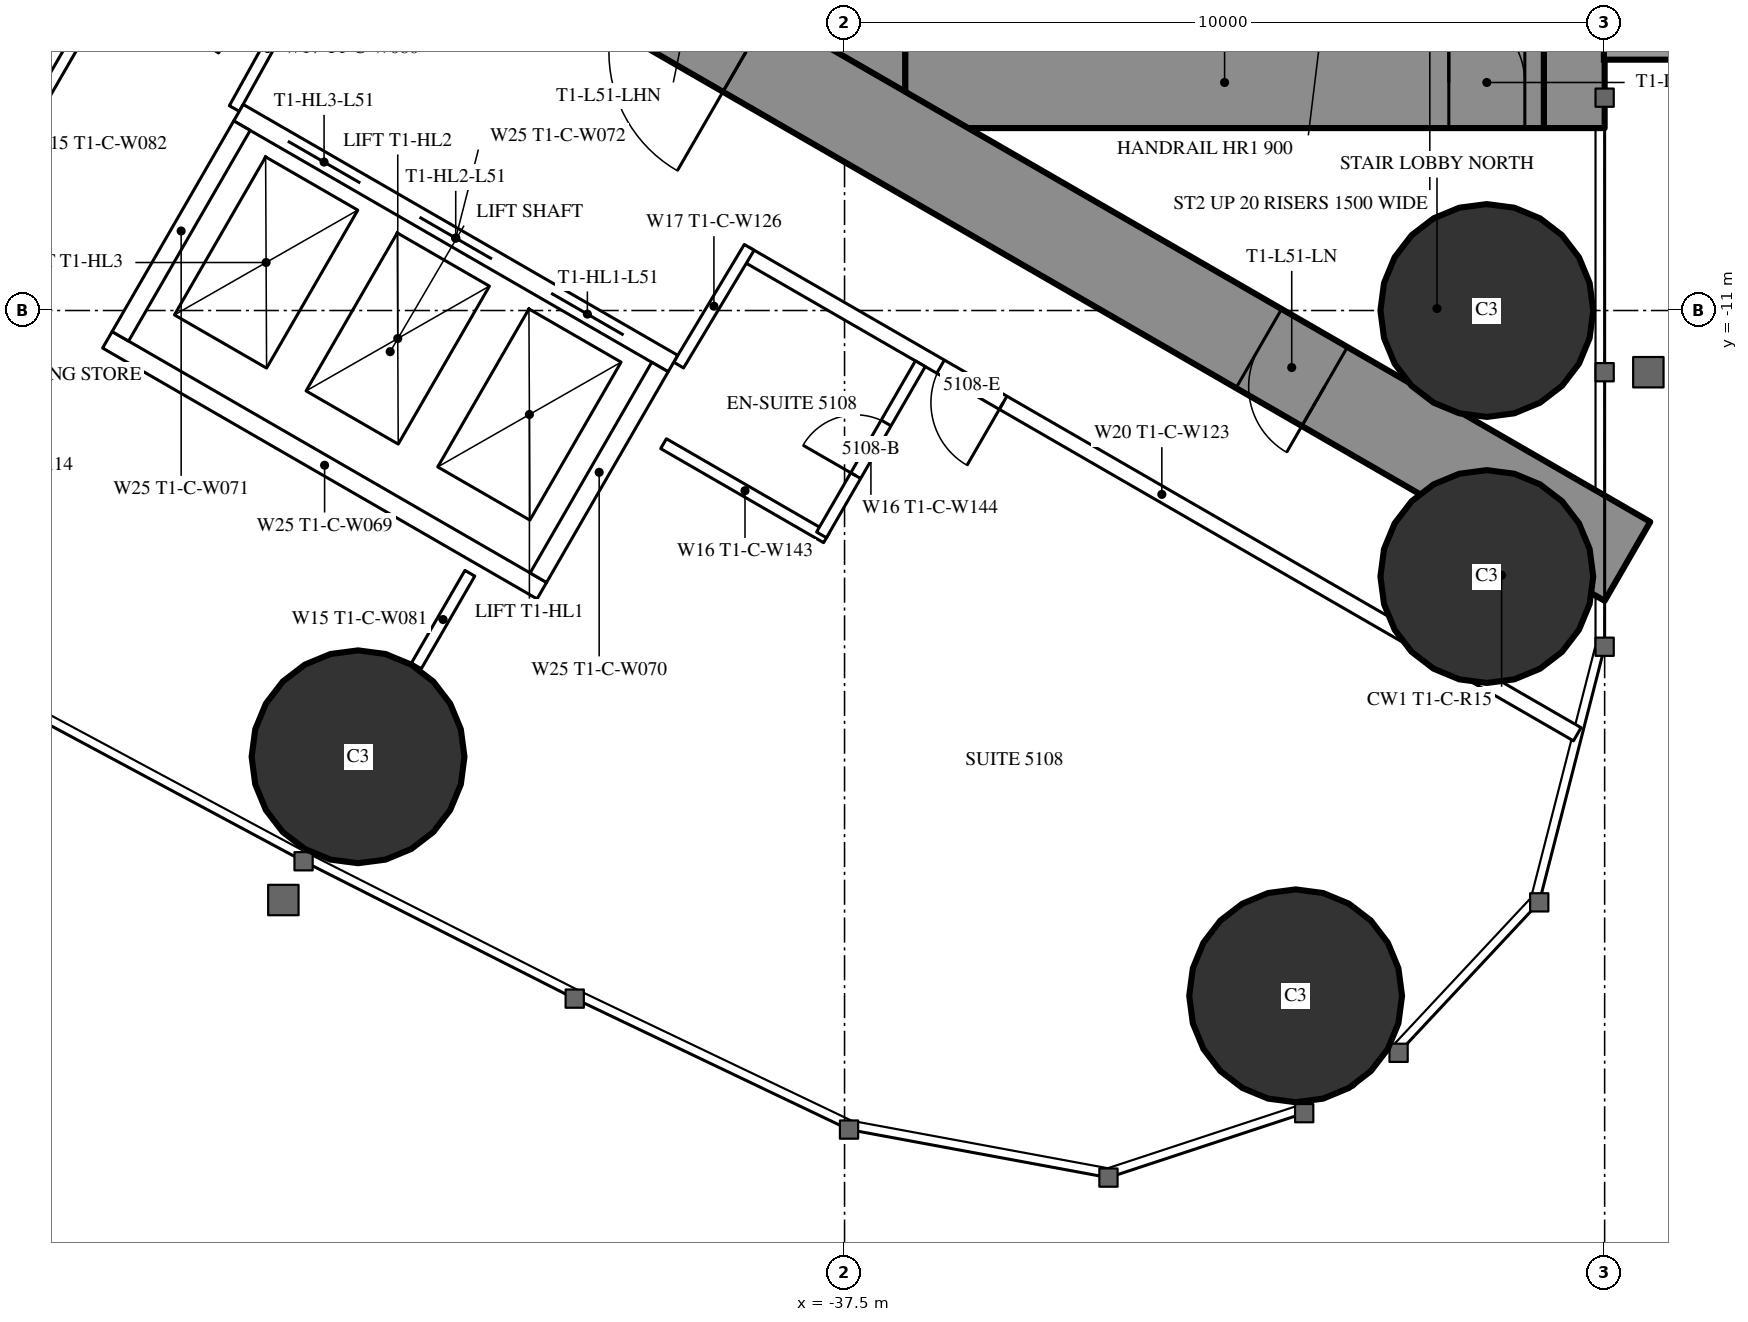
"""IFC4 building model, lengths in metres.
Left out: names, types, materials, properties, quantities, classifications, styles, units other than length and angle.
Written with IfcOpenShell. Run it as: python <this file> out.ifc"""

import sys

from ifc_helpers import new_model, si_unit, direction, frame, frame_2d, origin, origin_2d, place, context, subcontext, project, spatial, rectangle, circle, extrude, element, fill, save


model = new_model("IFC4")
c1 = context("Model", 3, precision=1e-05, world=origin(), true_north=direction((0.0, 1.0)))
c2 = subcontext(c1, "Body", "Model", "MODEL_VIEW")
j1 = project(units=[si_unit("LENGTHUNIT", "METRE"), si_unit("PLANEANGLEUNIT", "RADIAN")], contexts=[c1])
p1 = place(None, origin())
s1 = spatial("IfcSite", under=j1, at=p1, CompositionType="ELEMENT")
p2 = place(p1, origin())
s2 = spatial("IfcBuilding", under=s1, at=p2, CompositionType="ELEMENT")
p3 = place(p2, frame((0.0, 0.0, 191.3)))
s3 = spatial("IfcBuildingStorey", under=s2, at=p3, CompositionType="ELEMENT", Elevation=191.3)
for number, where, z_axis, x_axis in (
    (1, (-31.565, -20.016, 0.0), (0.0, 0.0, 1.0), (1.0, 0.0, 0.0)),
    (2, (-29.05, -11.0, 0.0), (0.0, 0.0, 1.0), (1.0, 0.0, 0.0)),
    (3, (-29.05, -14.5, 0.0), (0.0, 0.0, 1.0), (1.0, 0.0, 0.0)),
    (4, (-43.9, -16.871, 0.0), (0.0, 0.0, 1.0), (1.0, 0.0, 0.0)),
):
    element("IfcColumn", number, at=place(p3, frame(where, z_axis=z_axis, x_axis=x_axis)), inside=s3, PredefinedType="COLUMN", context=c2, shape_type="SweptSolid", body=[
        extrude(circle(Radius=1.4, at=origin_2d()), origin(), (0.0, 0.0, 1.0), 3.5),
    ])
p4 = place(p3, frame((-27.9, 8.6, 0.0), z_axis=(0.0, 0.0, 1.0), x_axis=(0.0, -1.0, 0.0)))
e5 = element("IfcWall", 5, at=p4, inside=s3, PredefinedType="SHEAR", context=c2, shape_type="SweptSolid", body=[
    extrude(rectangle(XDim=17.2, YDim=0.8, at=frame_2d((8.6, 0.0))), origin(), (0.0, 0.0, 1.0), 3.5),
])
p5 = place(p4, frame((2.45, 0.0, 0.6)))
e6 = element("IfcOpeningElement", 6, at=p5, cuts=e5, PredefinedType="OPENING", context=c2, shape_type="SweptSolid", body=[
    extrude(rectangle(XDim=0.6, YDim=2.1, at=frame_2d((0.3, 1.05))), frame((0.0, 0.41, 0.0), z_axis=(0.0, -1.0, 0.0), x_axis=(1.0, 0.0, 0.0)), (0.0, 0.0, 1.0), 0.82),
])
p6 = place(p4, frame((14.15, 0.0, 0.6)))
e7 = element("IfcOpeningElement", 7, at=p6, cuts=e5, PredefinedType="OPENING", context=c2, shape_type="SweptSolid", body=[
    extrude(rectangle(XDim=0.6, YDim=2.1, at=frame_2d((0.3, 1.05))), frame((0.0, 0.41, 0.0), z_axis=(0.0, -1.0, 0.0), x_axis=(1.0, 0.0, 0.0)), (0.0, 0.0, 1.0), 0.82),
])
p7 = place(p3, frame((-37.3, 8.6, 0.0), z_axis=(0.0, 0.0, 1.0), x_axis=(0.0, -1.0, 0.0)))
e8 = element("IfcWall", 8, at=p7, inside=s3, PredefinedType="SHEAR", context=c2, shape_type="SweptSolid", body=[
    extrude(rectangle(XDim=17.2, YDim=1.2, at=frame_2d((8.6, 0.0))), origin(), (0.0, 0.0, 1.0), 3.5),
])
p8 = place(p7, frame((7.7, 0.0, 0.0)))
e9 = element("IfcOpeningElement", 9, at=p8, cuts=e8, PredefinedType="OPENING", context=c2, shape_type="SweptSolid", body=[
    extrude(rectangle(XDim=1.8, YDim=2.2, at=frame_2d((0.9, 1.1))), frame((0.0, 0.61, 0.0), z_axis=(0.0, -1.0, 0.0), x_axis=(1.0, 0.0, 0.0)), (0.0, 0.0, 1.0), 1.22),
])
p9 = place(p3, frame((-28.3, -8.0, 0.0), z_axis=(0.0, 0.0, 1.0), x_axis=(-1.0, 0.0, 0.0)))
e10 = element("IfcWall", 10, at=p9, inside=s3, PredefinedType="SHEAR", context=c2, shape_type="SweptSolid", body=[
    extrude(rectangle(XDim=8.4, YDim=1.2, at=frame_2d((4.2, 0.0))), origin(), (0.0, 0.0, 1.0), 3.5),
])
p10 = place(p9, frame((0.25, 0.0, 0.0)))
e11 = element("IfcOpeningElement", 11, at=p10, cuts=e10, PredefinedType="OPENING", context=c2, shape_type="SweptSolid", body=[
    extrude(rectangle(XDim=1.0, YDim=2.2, at=frame_2d((0.5, 1.1))), frame((0.0, 0.61, 0.0), z_axis=(0.0, -1.0, 0.0), x_axis=(1.0, 0.0, 0.0)), (0.0, 0.0, 1.0), 1.22),
])
p11 = place(p3, frame((-27.2, -14.3, 0.0), z_axis=(0.0, 0.0, 1.0), x_axis=(-0.866024021859, 0.500002393557, 0.0)))
e12 = element("IfcWall", 12, at=p11, inside=s3, PredefinedType="SHEAR", context=c2, shape_type="SweptSolid", body=[
    extrude(rectangle(XDim=27.907, YDim=1.2, at=frame_2d((13.954, 0.0))), origin(), (0.0, 0.0, 1.0), 3.5),
])
p12 = place(p11, frame((4.6, 0.0, 0.0)))
e13 = element("IfcOpeningElement", 13, at=p12, cuts=e12, PredefinedType="OPENING", context=c2, shape_type="SweptSolid", body=[
    extrude(rectangle(XDim=1.0, YDim=2.2, at=frame_2d((0.5, 1.1))), frame((0.0, 0.61, 0.0), z_axis=(0.0, -1.0, 0.0), x_axis=(1.0, 0.0, 0.0)), (0.0, 0.0, 1.0), 1.22),
])
p13 = place(p11, frame((13.395, 0.0, 0.0)))
e14 = element("IfcOpeningElement", 14, at=p13, cuts=e12, PredefinedType="OPENING", context=c2, shape_type="SweptSolid", body=[
    extrude(rectangle(XDim=1.8, YDim=2.2, at=frame_2d((0.9, 1.1))), frame((0.0, 0.61, 0.0), z_axis=(0.0, -1.0, 0.0), x_axis=(1.0, 0.0, 0.0)), (0.0, 0.0, 1.0), 1.22),
])
p14 = place(p3, frame((-46.679, -5.825, 0.0), z_axis=(0.0, 0.0, 1.0), x_axis=(-0.500006839597, -0.866021454905, 0.0)))
e15 = element("IfcWall", 15, at=p14, inside=s3, PredefinedType="PARTITIONING", context=c2, shape_type="SweptSolid", body=[
    extrude(rectangle(XDim=6.911, YDim=0.15, at=frame_2d((3.456, 0.0))), origin(), (0.0, 0.0, 1.0), 2.3),
])
p15 = place(p3, frame((-42.429, -14.457, 0.0), z_axis=(0.0, 0.0, 1.0), x_axis=(-0.5000578829, -0.865991982497, 0.0)))
e16 = element("IfcWall", 16, at=p15, inside=s3, PredefinedType="PARTITIONING", context=c2, shape_type="SweptSolid", body=[
    extrude(rectangle(XDim=1.407, YDim=0.15, at=frame_2d((0.704, 0.0))), origin(), (0.0, 0.0, 1.0), 3.25),
])
p16 = place(p3, frame((-27.86, -16.575, 0.0), z_axis=(0.0, 0.0, 1.0), x_axis=(-0.866027756871, 0.499995924312, 0.0)))
e17 = element("IfcWall", 17, at=p16, inside=s3, PredefinedType="PARTITIONING", context=c2, shape_type="SweptSolid", body=[
    extrude(rectangle(XDim=12.622, YDim=0.2, at=frame_2d((6.311, 0.0))), origin(), (0.0, 0.0, 1.0), 3.25),
])
p17 = place(p16, frame((8.722, 0.0, 0.0)))
e18 = element("IfcOpeningElement", 18, at=p17, cuts=e17, PredefinedType="OPENING", context=c2, shape_type="SweptSolid", body=[
    extrude(rectangle(XDim=0.95, YDim=2.2, at=frame_2d((0.475, 1.1))), frame((0.0, 0.11, 0.0), z_axis=(0.0, -1.0, 0.0), x_axis=(1.0, 0.0, 0.0)), (0.0, 0.0, 1.0), 0.22),
])
for number, where, z_axis, x_axis in (
    (19, (-39.683, -11.718, 0.0), (0.0, 0.0, 1.0), (0.514, 0.858, 0.0)),
    (20, (-44.652, -6.764, 0.0), (0.0, 0.0, 1.0), (-0.485, -0.874, 0.0)),
):
    element("IfcWall", number, at=place(p3, frame(where, z_axis=z_axis, x_axis=x_axis)), inside=s3, PredefinedType="PARTITIONING", context=c2, shape_type="SweptSolid", body=[
        extrude(rectangle(XDim=1.805, YDim=0.15, at=frame_2d((0.903, 0.0))), origin(), (0.0, 0.0, 1.0), 3.25),
    ])
p18 = place(p3, frame((-37.738, -13.989, 0.0), z_axis=(0.0, 0.0, 1.0), x_axis=(-0.86604923931, 0.499958713387, 0.0)))
e21 = element("IfcWall", 21, at=p18, inside=s3, PredefinedType="PARTITIONING", context=c2, shape_type="SweptSolid", body=[
    extrude(rectangle(XDim=2.475, YDim=0.15, at=frame_2d((1.237, 0.0))), origin(), (0.0, 0.0, 1.0), 3.25),
])
p19 = place(p3, frame((-36.503, -11.7, 0.0), z_axis=(0.0, 0.0, 1.0), x_axis=(-0.500006934395, -0.866021400173, 0.0)))
e22 = element("IfcWall", 22, at=p19, inside=s3, PredefinedType="PARTITIONING", context=c2, shape_type="SweptSolid", body=[
    extrude(rectangle(XDim=2.6, YDim=0.15, at=frame_2d((1.3, 0.0))), origin(), (0.0, 0.0, 1.0), 3.25),
])
p20 = place(p19, frame((0.9, 0.0, 0.0)))
e23 = element("IfcOpeningElement", 23, at=p20, cuts=e22, PredefinedType="OPENING", context=c2, shape_type="SweptSolid", body=[
    extrude(rectangle(XDim=0.8, YDim=2.2, at=frame_2d((0.4, 1.1))), frame((0.0, 0.085, 0.0), z_axis=(0.0, -1.0, 0.0), x_axis=(1.0, 0.0, 0.0)), (0.0, 0.0, 1.0), 0.17),
])
p21 = place(p3, frame((-39.758, -11.697, 0.0), z_axis=(0.0, 0.0, 1.0), x_axis=(-0.866024194504, 0.500002094529, 0.0)))
e24 = element("IfcWall", 24, at=p21, inside=s3, PredefinedType="PARTITIONING", context=c2, shape_type="SweptSolid", body=[
    extrude(rectangle(XDim=6.6, YDim=0.25, at=frame_2d((3.3, 0.0))), origin(), (0.0, 0.0, 1.0), 3.25),
])
p22 = place(p21, frame((0.75, 0.0, 0.0)))
e25 = element("IfcOpeningElement", 25, at=p22, cuts=e24, PredefinedType="OPENING", context=c2, shape_type="SweptSolid", body=[
    extrude(rectangle(XDim=1.1, YDim=2.2, at=frame_2d((0.55, 1.1))), frame((0.0, 0.135, 0.0), z_axis=(0.0, -1.0, 0.0), x_axis=(1.0, 0.0, 0.0)), (0.0, 0.0, 1.0), 0.27),
])
p23 = place(p21, frame((2.75, 0.0, 0.0)))
e26 = element("IfcOpeningElement", 26, at=p23, cuts=e24, PredefinedType="OPENING", context=c2, shape_type="SweptSolid", body=[
    extrude(rectangle(XDim=1.1, YDim=2.2, at=frame_2d((0.55, 1.1))), frame((0.0, 0.135, 0.0), z_axis=(0.0, -1.0, 0.0), x_axis=(1.0, 0.0, 0.0)), (0.0, 0.0, 1.0), 0.27),
])
p24 = place(p21, frame((4.75, 0.0, 0.0)))
e27 = element("IfcOpeningElement", 27, at=p24, cuts=e24, PredefinedType="OPENING", context=c2, shape_type="SweptSolid", body=[
    extrude(rectangle(XDim=1.1, YDim=2.2, at=frame_2d((0.55, 1.1))), frame((0.0, 0.135, 0.0), z_axis=(0.0, -1.0, 0.0), x_axis=(1.0, 0.0, 0.0)), (0.0, 0.0, 1.0), 0.27),
])
p25 = place(p3, frame((-41.482, -14.686, 0.0), z_axis=(0.0, 0.0, 1.0), x_axis=(-0.86603344179, 0.499986077507, 0.0)))
e28 = element("IfcWall", 28, at=p25, inside=s3, PredefinedType="PARTITIONING", context=c2, shape_type="SweptSolid", body=[
    extrude(rectangle(XDim=6.6, YDim=0.25, at=frame_2d((3.3, 0.0))), origin(), (0.0, 0.0, 1.0), 3.25),
])
for number, where, z_axis, x_axis in (
    (29, (-39.928, -11.743, 0.0), (0.0, 0.0, 1.0), (-0.5, -0.866, 0.0)),
    (30, (-45.428, -8.568, 0.0), (0.0, 0.0, 1.0), (-0.5, -0.866, 0.0)),
):
    element("IfcWall", number, at=place(p3, frame(where, z_axis=z_axis, x_axis=x_axis)), inside=s3, PredefinedType="PARTITIONING", context=c2, shape_type="SweptSolid", body=[
        extrude(rectangle(XDim=3.201, YDim=0.25, at=frame_2d((1.6, 0.0))), origin(), (0.0, 0.0, 1.0), 3.25),
    ])
p26 = place(p20, origin())
e31 = element("IfcDoor", 31, at=p26, inside=s3, OperationType="SINGLE_SWING_RIGHT", PredefinedType="DOOR", context=c2, shape_type="SweptSolid", body=[
    extrude(rectangle(XDim=0.8, YDim=2.2, at=frame_2d((0.4, 1.1))), frame((0.0, 0.025, 0.0), z_axis=(0.0, -1.0, 0.0), x_axis=(1.0, 0.0, 0.0)), (0.0, 0.0, 1.0), 0.05),
])
fill(e23, e31)
p27 = place(p17, origin())
e32 = element("IfcDoor", 32, at=p27, inside=s3, OperationType="SINGLE_SWING_LEFT", PredefinedType="DOOR", context=c2, shape_type="SweptSolid", body=[
    extrude(rectangle(XDim=0.95, YDim=2.2, at=frame_2d((0.475, 1.1))), frame((0.0, 0.025, 0.0), z_axis=(0.0, -1.0, 0.0), x_axis=(1.0, 0.0, 0.0)), (0.0, 0.0, 1.0), 0.05),
])
fill(e18, e32)
p28 = place(p12, origin())
e33 = element("IfcDoor", 33, at=p28, inside=s3, OperationType="SINGLE_SWING_LEFT", PredefinedType="DOOR", context=c2, shape_type="SweptSolid", body=[
    extrude(rectangle(XDim=1.0, YDim=2.2, at=frame_2d((0.5, 1.1))), frame((0.0, 0.025, 0.0), z_axis=(0.0, -1.0, 0.0), x_axis=(1.0, 0.0, 0.0)), (0.0, 0.0, 1.0), 0.05),
])
fill(e13, e33)
p29 = place(p13, origin())
e34 = element("IfcDoor", 34, at=p29, inside=s3, OperationType="DOUBLE_DOOR_SINGLE_SWING", PredefinedType="DOOR", context=c2, shape_type="SweptSolid", body=[
    extrude(rectangle(XDim=1.8, YDim=2.2, at=frame_2d((0.9, 1.1))), frame((0.0, 0.025, 0.0), z_axis=(0.0, -1.0, 0.0), x_axis=(1.0, 0.0, 0.0)), (0.0, 0.0, 1.0), 0.05),
])
fill(e14, e34)
p30 = place(p10, origin())
e35 = element("IfcDoor", 35, at=p30, inside=s3, OperationType="SINGLE_SWING_RIGHT", PredefinedType="DOOR", context=c2, shape_type="SweptSolid", body=[
    extrude(rectangle(XDim=1.0, YDim=2.2, at=frame_2d((0.5, 1.1))), frame((0.0, 0.025, 0.0), z_axis=(0.0, -1.0, 0.0), x_axis=(1.0, 0.0, 0.0)), (0.0, 0.0, 1.0), 0.05),
])
fill(e11, e35)
p31 = place(p22, origin())
e36 = element("IfcDoor", 36, at=p31, inside=s3, OperationType="DOUBLE_DOOR_SLIDING", PredefinedType="USERDEFINED", context=c2, shape_type="SweptSolid", body=[
    extrude(rectangle(XDim=1.1, YDim=2.2, at=frame_2d((0.55, 1.1))), frame((0.0, 0.025, 0.0), z_axis=(0.0, -1.0, 0.0), x_axis=(1.0, 0.0, 0.0)), (0.0, 0.0, 1.0), 0.05),
])
fill(e25, e36)
p32 = place(p23, origin())
e37 = element("IfcDoor", 37, at=p32, inside=s3, OperationType="DOUBLE_DOOR_SLIDING", PredefinedType="USERDEFINED", context=c2, shape_type="SweptSolid", body=[
    extrude(rectangle(XDim=1.1, YDim=2.2, at=frame_2d((0.55, 1.1))), frame((0.0, 0.025, 0.0), z_axis=(0.0, -1.0, 0.0), x_axis=(1.0, 0.0, 0.0)), (0.0, 0.0, 1.0), 0.05),
])
fill(e26, e37)
p33 = place(p24, origin())
e38 = element("IfcDoor", 38, at=p33, inside=s3, OperationType="DOUBLE_DOOR_SLIDING", PredefinedType="USERDEFINED", context=c2, shape_type="SweptSolid", body=[
    extrude(rectangle(XDim=1.1, YDim=2.2, at=frame_2d((0.55, 1.1))), frame((0.0, 0.025, 0.0), z_axis=(0.0, -1.0, 0.0), x_axis=(1.0, 0.0, 0.0)), (0.0, 0.0, 1.0), 0.05),
])
fill(e27, e38)
save(model, sys.argv[1])
